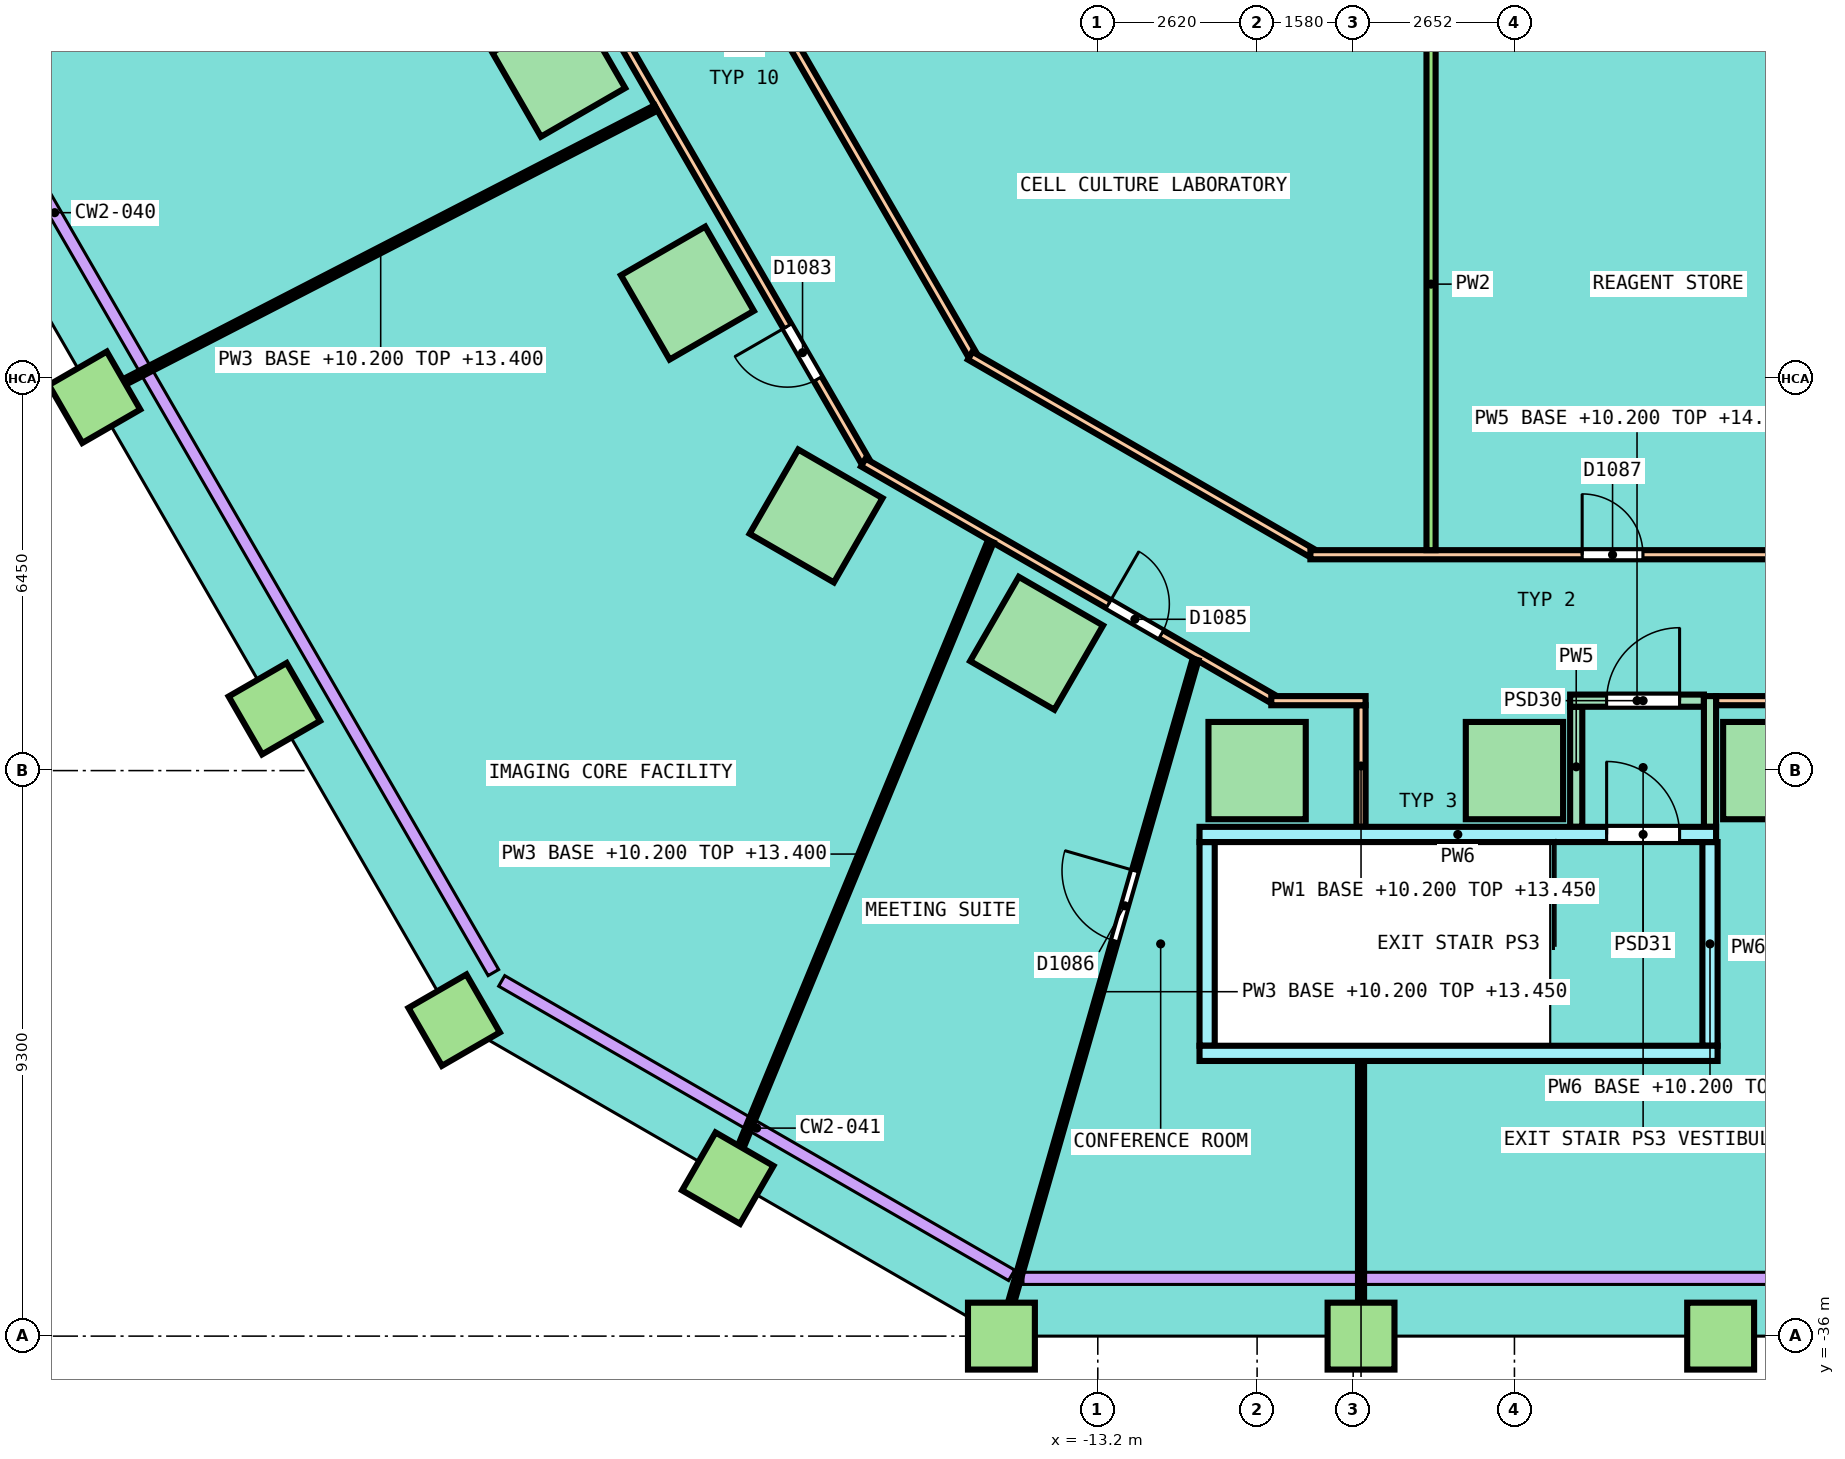
"""IFC4 building model, lengths in metres.
Left out: names, types, materials, properties, quantities, classifications, styles, units other than length and angle.
Written with IfcOpenShell. Run it as: python <this file> out.ifc"""

import sys

from ifc_helpers import new_model, si_unit, direction, frame, frame_2d, origin, origin_2d, place, context, subcontext, project, spatial, rectangle, extrude, element, fill, save


model = new_model("IFC4")
c1 = context("Model", 3, precision=1e-05, world=origin(), true_north=direction((0.0, 1.0)))
c2 = subcontext(c1, "Body", "Model", "MODEL_VIEW")
j1 = project(units=[si_unit("LENGTHUNIT", "METRE"), si_unit("PLANEANGLEUNIT", "RADIAN")], contexts=[c1])
p1 = place(None, origin())
s1 = spatial("IfcSite", under=j1, at=p1, CompositionType="ELEMENT")
p2 = place(p1, origin())
s2 = spatial("IfcBuilding", under=s1, at=p2, CompositionType="ELEMENT")
p3 = place(p2, frame((0.0, 0.0, 10.2)))
s3 = spatial("IfcBuildingStorey", under=s2, at=p3, CompositionType="ELEMENT", Elevation=10.2)
for number, where, z_axis, x_axis in (
    (1, (-22.065, -15.183, 0.0), (0.0, 0.0, 1.0), (0.5, -0.866, 0.0)),
    (2, (-19.949, -18.847, 0.0), (0.0, 0.0, 1.0), (0.5, -0.866, 0.0)),
    (3, (-17.833, -22.512, 0.0), (0.0, 0.0, 1.0), (0.866, -0.5, 0.0)),
    (4, (-14.206, -24.606, 0.0), (0.0, 0.0, 1.0), (0.866, -0.5, 0.0)),
    (5, (-10.58, -26.7, 0.0), (0.0, 0.0, 1.0), (1.0, 0.0, 0.0)),
    (6, (-6.348, -26.7, 0.0), (0.0, 0.0, 1.0), (1.0, 0.0, 0.0)),
    (7, (-2.116, -26.7, 0.0), (0.0, 0.0, 1.0), (1.0, 0.0, 0.0)),
):
    element("IfcColumn", number, at=place(p3, frame(where, z_axis=z_axis, x_axis=x_axis)), inside=s3, PredefinedType="COLUMN", context=c2, shape_type="SweptSolid", body=[
        extrude(rectangle(XDim=1.6, YDim=1.6, at=origin_2d()), origin(), (0.0, 0.0, 1.0), 4.05),
    ])
for number, where, z_axis, x_axis in (
    (8, (-29.698, -20.561, 0.0), (0.0, 0.0, 1.0), (0.5, -0.866, 0.0)),
    (9, (-26.741, -25.682, 0.0), (0.0, 0.0, 1.0), (0.5, -0.866, 0.0)),
    (10, (-23.785, -30.804, 0.0), (0.0, 0.0, 1.0), (0.5, -0.866, 0.0)),
    (11, (-19.285, -33.402, 0.0), (0.0, 0.0, 1.0), (0.866, -0.5, 0.0)),
    (12, (-14.785, -36.0, 0.0), (0.0, 0.0, 1.0), (1.0, 0.0, 0.0)),
    (13, (-8.871, -36.0, 0.0), (0.0, 0.0, 1.0), (1.0, 0.0, 0.0)),
    (14, (-2.957, -36.0, 0.0), (0.0, 0.0, 1.0), (1.0, 0.0, 0.0)),
):
    element("IfcColumn", number, at=place(p3, frame(where, z_axis=z_axis, x_axis=x_axis)), inside=s3, PredefinedType="COLUMN", context=c2, shape_type="SweptSolid", body=[
        extrude(rectangle(XDim=1.1, YDim=1.1, at=origin_2d()), origin(), (0.0, 0.0, 1.0), 4.05),
    ])
p4 = place(p3, frame((-8.871, -27.625, 0.0), z_axis=(0.0, 0.0, 1.0), x_axis=(0.0, 1.0, 0.0)))
e15 = element("IfcWall", 15, at=p4, inside=s3, PredefinedType="PARTITIONING", context=c2, shape_type="SweptSolid", body=[
    extrude(rectangle(XDim=2.0, YDim=0.15, at=frame_2d((1.0, 0.0))), origin(), (0.0, 0.0, 1.0), 3.25),
])
p5 = place(p3, frame((-22.753, -6.89, 0.0), z_axis=(0.0, 0.0, 1.0), x_axis=(0.499997859304, -0.866026639712, 0.0)))
e16 = element("IfcWall", 16, at=p5, inside=s3, PredefinedType="PARTITIONING", context=c2, shape_type="SweptSolid", body=[
    extrude(rectangle(XDim=14.963, YDim=0.15, at=frame_2d((7.482, 0.0))), origin(), (0.0, 0.0, 1.0), 3.05),
])
p6 = place(p5, frame((7.098, 0.0, 0.0)))
e17 = element("IfcOpeningElement", 17, at=p6, cuts=e16, PredefinedType="OPENING", context=c2, shape_type="SweptSolid", body=[
    extrude(rectangle(XDim=1.2, YDim=2.1, at=frame_2d((0.6, 1.05))), frame((0.0, 0.085, 0.0), z_axis=(0.0, -1.0, 0.0), x_axis=(1.0, 0.0, 0.0)), (0.0, 0.0, 1.0), 0.17),
])
p7 = place(p3, frame((-27.3, -3.814, 0.0), z_axis=(0.0, 0.0, 1.0), x_axis=(0.499997805905, -0.866026670542, 0.0)))
e18 = element("IfcWall", 18, at=p7, inside=s3, PredefinedType="PARTITIONING", context=c2, shape_type="SweptSolid", body=[
    extrude(rectangle(XDim=20.543, YDim=0.15, at=frame_2d((10.272, 0.0))), origin(), (0.0, 0.0, 1.0), 3.05),
])
p8 = place(p7, frame((4.954, 0.0, 0.0)))
e19 = element("IfcOpeningElement", 19, at=p8, cuts=e18, PredefinedType="OPENING", context=c2, shape_type="SweptSolid", body=[
    extrude(rectangle(XDim=1.2, YDim=2.1, at=frame_2d((0.6, 1.05))), frame((0.0, 0.085, 0.0), z_axis=(0.0, -1.0, 0.0), x_axis=(1.0, 0.0, 0.0)), (0.0, 0.0, 1.0), 0.17),
])
p9 = place(p7, frame((17.99, 0.0, 0.0)))
e20 = element("IfcOpeningElement", 20, at=p9, cuts=e18, PredefinedType="OPENING", context=c2, shape_type="SweptSolid", body=[
    extrude(rectangle(XDim=1.0, YDim=2.1, at=frame_2d((0.5, 1.05))), frame((0.0, 0.085, 0.0), z_axis=(0.0, -1.0, 0.0), x_axis=(1.0, 0.0, 0.0)), (0.0, 0.0, 1.0), 0.17),
])
p10 = place(p3, frame((-17.056, -21.633, 0.0), z_axis=(0.0, 0.0, 1.0), x_axis=(0.866023143435, -0.50000391502, 0.0)))
e21 = element("IfcWall", 21, at=p10, inside=s3, PredefinedType="PARTITIONING", context=c2, shape_type="SweptSolid", body=[
    extrude(rectangle(XDim=7.759, YDim=0.15, at=frame_2d((3.879, 0.0))), origin(), (0.0, 0.0, 1.0), 3.05),
])
p11 = place(p10, frame((4.657, 0.0, 0.0)))
e22 = element("IfcOpeningElement", 22, at=p11, cuts=e21, PredefinedType="OPENING", context=c2, shape_type="SweptSolid", body=[
    extrude(rectangle(XDim=1.0, YDim=2.1, at=frame_2d((0.5, 1.05))), frame((0.0, 0.085, 0.0), z_axis=(0.0, -1.0, 0.0), x_axis=(1.0, 0.0, 0.0)), (0.0, 0.0, 1.0), 0.17),
])
p12 = place(p3, frame((-15.299, -19.876, 0.0), z_axis=(0.0, 0.0, 1.0), x_axis=(0.866024786089, -0.500001069878, 0.0)))
e23 = element("IfcWall", 23, at=p12, inside=s3, PredefinedType="PARTITIONING", context=c2, shape_type="SweptSolid", body=[
    extrude(rectangle(XDim=6.473, YDim=0.15, at=frame_2d((3.236, 0.0))), origin(), (0.0, 0.0, 1.0), 3.05),
])
p13 = place(p3, frame((-9.704, -23.15, 0.0), z_axis=(0.0, 0.0, 1.0), x_axis=(1.0, 0.0, 0.0)))
e24 = element("IfcWall", 24, at=p13, inside=s3, PredefinedType="PARTITIONING", context=c2, shape_type="SweptSolid", body=[
    extrude(rectangle(XDim=16.429, YDim=0.15, at=frame_2d((8.214, 0.0))), origin(), (0.0, 0.0, 1.0), 3.05),
])
p14 = place(p13, frame((4.469, 0.0, 0.0)))
e25 = element("IfcOpeningElement", 25, at=p14, cuts=e24, PredefinedType="OPENING", context=c2, shape_type="SweptSolid", body=[
    extrude(rectangle(XDim=1.0, YDim=2.1, at=frame_2d((0.5, 1.05))), frame((0.0, 0.085, 0.0), z_axis=(0.0, -1.0, 0.0), x_axis=(1.0, 0.0, 0.0)), (0.0, 0.0, 1.0), 0.17),
])
p15 = place(p3, frame((-10.347, -25.55, 0.0), z_axis=(0.0, 0.0, 1.0), x_axis=(1.0, 0.0, 0.0)))
e26 = element("IfcWall", 26, at=p15, inside=s3, PredefinedType="PARTITIONING", context=c2, shape_type="SweptSolid", body=[
    extrude(rectangle(XDim=1.551, YDim=0.15, at=frame_2d((0.775, 0.0))), origin(), (0.0, 0.0, 1.0), 3.05),
])
p16 = place(p3, frame((-3.032, -25.55, 0.0), z_axis=(0.0, 0.0, 1.0), x_axis=(1.0, 0.0, 0.0)))
e27 = element("IfcWall", 27, at=p16, inside=s3, PredefinedType="PARTITIONING", context=c2, shape_type="SweptSolid", body=[
    extrude(rectangle(XDim=6.064, YDim=0.15, at=frame_2d((3.032, 0.0))), origin(), (0.0, 0.0, 1.0), 3.05),
])
p17 = place(p16, frame((2.432, 0.0, 0.0)))
e28 = element("IfcOpeningElement", 28, at=p17, cuts=e27, PredefinedType="OPENING", context=c2, shape_type="SweptSolid", body=[
    extrude(rectangle(XDim=1.2, YDim=2.1, at=frame_2d((0.6, 1.05))), frame((0.0, 0.085, 0.0), z_axis=(0.0, -1.0, 0.0), x_axis=(1.0, 0.0, 0.0)), (0.0, 0.0, 1.0), 0.17),
])
p18 = place(p3, frame((-5.332, -27.625, 0.0), z_axis=(0.0, 0.0, 1.0), x_axis=(0.0, 1.0, 0.0)))
e29 = element("IfcWall", 29, at=p18, inside=s3, PredefinedType="PARTITIONING", context=c2, shape_type="SweptSolid", body=[
    extrude(rectangle(XDim=1.975, YDim=0.2, at=frame_2d((0.988, 0.0))), origin(), (0.0, 0.0, 1.0), 3.25),
])
p19 = place(p3, frame((-5.432, -25.55, 0.0), z_axis=(0.0, 0.0, 1.0), x_axis=(1.0, 0.0, 0.0)))
e30 = element("IfcWall", 30, at=p19, inside=s3, PredefinedType="PARTITIONING", context=c2, shape_type="SweptSolid", body=[
    extrude(rectangle(XDim=2.2, YDim=0.2, at=frame_2d((1.1, 0.0))), origin(), (0.0, 0.0, 1.0), 4.05),
])
p20 = place(p19, frame((1.8, 0.0, 0.0), z_axis=(0.0, 0.0, 1.0), x_axis=(-1.0, 0.0, 0.0)))
e31 = element("IfcOpeningElement", 31, at=p20, cuts=e30, PredefinedType="OPENING", context=c2, shape_type="SweptSolid", body=[
    extrude(rectangle(XDim=1.2, YDim=2.1, at=frame_2d((0.6, 1.05))), frame((0.0, 0.11, 0.0), z_axis=(0.0, -1.0, 0.0), x_axis=(1.0, 0.0, 0.0)), (0.0, 0.0, 1.0), 0.22),
])
p21 = place(p3, frame((-3.132, -27.625, 0.0), z_axis=(0.0, 0.0, 1.0), x_axis=(0.0, 1.0, 0.0)))
e32 = element("IfcWall", 32, at=p21, inside=s3, PredefinedType="PARTITIONING", context=c2, shape_type="SweptSolid", body=[
    extrude(rectangle(XDim=2.15, YDim=0.2, at=frame_2d((1.075, 0.0))), origin(), (0.0, 0.0, 1.0), 3.25),
])
p22 = place(p3, frame((-7.719, -23.075, 0.0), z_axis=(0.0, 0.0, 1.0), x_axis=(0.0, 1.0, 0.0)))
e33 = element("IfcWall", 33, at=p22, inside=s3, PredefinedType="PARTITIONING", context=c2, shape_type="SweptSolid", body=[
    extrude(rectangle(XDim=8.75, YDim=0.15, at=frame_2d((4.375, 0.0))), origin(), (0.0, 0.0, 1.0), 3.05),
])
p23 = place(p3, frame((-8.871, -35.8, 0.0), z_axis=(0.0, 0.0, 1.0), x_axis=(0.0, 1.0, 0.0)))
e34 = element("IfcWall", 34, at=p23, inside=s3, PredefinedType="PARTITIONING", context=c2, shape_type="SweptSolid", body=[
    extrude(rectangle(XDim=4.325, YDim=0.1, at=frame_2d((2.163, 0.0))), origin(), (0.0, 0.0, 1.0), 4.0),
])
p24 = place(p3, frame((-29.521, -20.469, 0.0), z_axis=(0.0, 0.0, 1.0), x_axis=(0.888930498325, 0.458042104122, 0.0)))
e35 = element("IfcWall", 35, at=p24, inside=s3, PredefinedType="PARTITIONING", context=c2, shape_type="SweptSolid", body=[
    extrude(rectangle(XDim=10.187, YDim=0.1, at=frame_2d((5.093, 0.0))), origin(), (0.0, 0.0, 1.0), 3.2),
])
p25 = place(p3, frame((-19.208, -33.216, 0.0), z_axis=(0.0, 0.0, 1.0), x_axis=(0.38176137663, 0.924260921663, 0.0)))
e36 = element("IfcWall", 36, at=p25, inside=s3, PredefinedType="PARTITIONING", context=c2, shape_type="SweptSolid", body=[
    extrude(rectangle(XDim=11.129, YDim=0.1, at=frame_2d((5.564, 0.0))), origin(), (0.0, 0.0, 1.0), 3.2),
])
p26 = place(p3, frame((-14.727, -35.8, 0.0), z_axis=(0.0, 0.0, 1.0), x_axis=(0.27581573325, 0.96121052912, 0.0)))
e37 = element("IfcWall", 37, at=p26, inside=s3, PredefinedType="PARTITIONING", context=c2, shape_type="SweptSolid", body=[
    extrude(rectangle(XDim=11.369, YDim=0.1, at=frame_2d((5.685, 0.0))), origin(), (0.0, 0.0, 1.0), 3.25),
])
p27 = place(p26, frame((6.553, 0.0, 0.0)))
e38 = element("IfcOpeningElement", 38, at=p27, cuts=e37, PredefinedType="OPENING", context=c2, shape_type="SweptSolid", body=[
    extrude(rectangle(XDim=1.2, YDim=2.1, at=frame_2d((0.6, 1.05))), frame((0.0, 0.06, 0.0), z_axis=(0.0, -1.0, 0.0), x_axis=(1.0, 0.0, 0.0)), (0.0, 0.0, 1.0), 0.12),
])
p28 = place(p3, frame((-11.402, -31.225, 0.0), z_axis=(0.0, 0.0, 1.0), x_axis=(0.0, 1.0, 0.0)))
e39 = element("IfcWall", 39, at=p28, inside=s3, PredefinedType="SOLIDWALL", context=c2, shape_type="SweptSolid", body=[
    extrude(rectangle(XDim=3.35, YDim=0.25, at=frame_2d((1.675, 0.0))), origin(), (0.0, 0.0, 1.0), 3.2),
])
p29 = place(p3, frame((-3.132, -31.225, 0.0), z_axis=(0.0, 0.0, 1.0), x_axis=(0.0, 1.0, 0.0)))
e40 = element("IfcWall", 40, at=p29, inside=s3, PredefinedType="SOLIDWALL", context=c2, shape_type="SweptSolid", body=[
    extrude(rectangle(XDim=3.35, YDim=0.25, at=frame_2d((1.675, 0.0))), origin(), (0.0, 0.0, 1.0), 4.0),
])
p30 = place(p3, frame((-11.527, -27.75, 0.0), z_axis=(0.0, 0.0, 1.0), x_axis=(1.0, 0.0, 0.0)))
e41 = element("IfcWall", 41, at=p30, inside=s3, PredefinedType="SOLIDWALL", context=c2, shape_type="SweptSolid", body=[
    extrude(rectangle(XDim=8.495, YDim=0.25, at=frame_2d((4.248, 0.0))), origin(), (0.0, 0.0, 1.0), 3.2),
])
p31 = place(p30, frame((7.895, 0.0, 0.0), z_axis=(0.0, 0.0, 1.0), x_axis=(-1.0, 0.0, 0.0)))
e42 = element("IfcOpeningElement", 42, at=p31, cuts=e41, PredefinedType="OPENING", context=c2, shape_type="SweptSolid", body=[
    extrude(rectangle(XDim=1.2, YDim=2.1, at=frame_2d((0.6, 1.05))), frame((0.0, 0.135, 0.0), z_axis=(0.0, -1.0, 0.0), x_axis=(1.0, 0.0, 0.0)), (0.0, 0.0, 1.0), 0.27),
])
p32 = place(p3, frame((-11.527, -31.35, 0.0), z_axis=(0.0, 0.0, 1.0), x_axis=(1.0, 0.0, 0.0)))
e43 = element("IfcWall", 43, at=p32, inside=s3, PredefinedType="SOLIDWALL", context=c2, shape_type="SweptSolid", body=[
    extrude(rectangle(XDim=8.52, YDim=0.25, at=frame_2d((4.26, 0.0))), origin(), (0.0, 0.0, 1.0), 3.2),
])
p33 = place(p3, frame((-24.277, -29.951, 0.0), z_axis=(0.0, 0.0, 1.0), x_axis=(-0.866031096941, -0.499990139034, 0.0)))
e44 = element("IfcWall", 44, at=p33, inside=s3, PredefinedType="SOLIDWALL", context=c2, shape_type="SweptSolid", body=[
    extrude(rectangle(XDim=3.0, YDim=0.4, at=frame_2d((1.5, 0.0))), origin(), (0.0, 0.0, 1.0), 4.2),
])
for number, where, z_axis, x_axis in (
    (45, (-31.15, -18.446, 0.0), (0.0, 0.0, 1.0), (0.5, -0.866, 0.0)),
    (46, (-33.402, -19.746, 0.0), (0.0, 0.0, 1.0), (0.5, -0.866, 0.0)),
):
    element("IfcWall", number, at=place(p3, frame(where, z_axis=z_axis, x_axis=x_axis)), inside=s3, PredefinedType="SOLIDWALL", context=c2, shape_type="SweptSolid", body=[
        extrude(rectangle(XDim=13.2, YDim=0.4, at=frame_2d((6.6, 0.0))), origin(), (0.0, 0.0, 1.0), 4.2),
    ])
p34 = place(p3, frame((-30.252, -33.401, 0.0), z_axis=(0.0, 0.0, 1.0), x_axis=(-0.866022959057, -0.500004234368, 0.0)))
e47 = element("IfcWall", 47, at=p34, inside=s3, PredefinedType="SOLIDWALL", context=c2, shape_type="SweptSolid", body=[
    extrude(rectangle(XDim=2.5, YDim=0.4, at=frame_2d((1.25, 0.0))), origin(), (0.0, 0.0, 1.0), 2.0),
])
p35 = place(p3, frame((-37.126, -21.896, 0.0), z_axis=(0.0, 0.0, 1.0), x_axis=(0.500010103361, -0.866019570528, 0.0)))
e48 = element("IfcWall", 48, at=p35, inside=s3, PredefinedType="SOLIDWALL", context=c2, shape_type="SweptSolid", body=[
    extrude(rectangle(XDim=13.2, YDim=0.4, at=frame_2d((6.6, 0.0))), origin(), (0.0, 0.0, 1.0), 2.0),
])
p36 = place(p3, frame((-24.077, -30.298, 0.0), z_axis=(0.0, 0.0, 1.0), x_axis=(-0.866031096941, -0.499990139034, 0.0)))
e49 = element("IfcWall", 49, at=p36, inside=s3, PredefinedType="SOLIDWALL", context=c2, shape_type="SweptSolid", body=[
    extrude(rectangle(XDim=3.0, YDim=0.4, at=frame_2d((1.5, 0.0))), origin(), (0.0, 0.0, 1.0), 4.4),
])
p37 = place(p3, frame((-26.675, -31.798, 0.0), z_axis=(0.0, 0.0, 1.0), x_axis=(-0.866000020948, -0.500043961785, 0.0)))
e50 = element("IfcWall", 50, at=p37, inside=s3, PredefinedType="SOLIDWALL", context=c2, shape_type="SweptSolid", body=[
    extrude(rectangle(XDim=1.95, YDim=0.4, at=frame_2d((0.975, 0.0))), origin(), (0.0, 0.0, 1.0), 4.4),
])
p38 = place(p3, frame((-28.364, -32.773, 0.0), z_axis=(0.0, 0.0, 1.0), x_axis=(-0.866054235095, -0.49995005938, 0.0)))
e51 = element("IfcWall", 51, at=p38, inside=s3, PredefinedType="SOLIDWALL", context=c2, shape_type="SweptSolid", body=[
    extrude(rectangle(XDim=1.95, YDim=0.4, at=frame_2d((0.975, 0.0))), origin(), (0.0, 0.0, 1.0), 3.379),
])
p39 = place(p3, frame((-30.052, -33.748, 0.0), z_axis=(0.0, 0.0, 1.0), x_axis=(-0.866022959057, -0.500004234368, 0.0)))
e52 = element("IfcWall", 52, at=p39, inside=s3, PredefinedType="SOLIDWALL", context=c2, shape_type="SweptSolid", body=[
    extrude(rectangle(XDim=2.5, YDim=0.4, at=frame_2d((1.25, 0.0))), origin(), (0.0, 0.0, 1.0), 2.2),
])
p40 = place(p9, origin())
e53 = element("IfcDoor", 53, at=p40, inside=s3, OperationType="SINGLE_SWING_RIGHT", PredefinedType="DOOR", context=c2, shape_type="SweptSolid", body=[
    extrude(rectangle(XDim=1.0, YDim=2.1, at=frame_2d((0.5, 1.05))), frame((0.0, 0.025, 0.0), z_axis=(0.0, -1.0, 0.0), x_axis=(1.0, 0.0, 0.0)), (0.0, 0.0, 1.0), 0.05),
])
fill(e20, e53)
p41 = place(p11, origin())
e54 = element("IfcDoor", 54, at=p41, inside=s3, OperationType="SINGLE_SWING_RIGHT", PredefinedType="DOOR", context=c2, shape_type="SweptSolid", body=[
    extrude(rectangle(XDim=1.0, YDim=2.1, at=frame_2d((0.5, 1.05))), frame((0.0, 0.025, 0.0), z_axis=(0.0, -1.0, 0.0), x_axis=(1.0, 0.0, 0.0)), (0.0, 0.0, 1.0), 0.05),
])
fill(e22, e54)
p42 = place(p27, origin())
e55 = element("IfcDoor", 55, at=p42, inside=s3, OperationType="DOUBLE_DOOR_SINGLE_SWING", PredefinedType="DOOR", context=c2, shape_type="SweptSolid", body=[
    extrude(rectangle(XDim=1.2, YDim=2.1, at=frame_2d((0.6, 1.05))), frame((0.0, 0.025, 0.0), z_axis=(0.0, -1.0, 0.0), x_axis=(1.0, 0.0, 0.0)), (0.0, 0.0, 1.0), 0.05),
])
fill(e38, e55)
p43 = place(p14, origin())
e56 = element("IfcDoor", 56, at=p43, inside=s3, OperationType="SINGLE_SWING_RIGHT", PredefinedType="DOOR", context=c2, shape_type="SweptSolid", body=[
    extrude(rectangle(XDim=1.0, YDim=2.1, at=frame_2d((0.5, 1.05))), frame((0.0, 0.025, 0.0), z_axis=(0.0, -1.0, 0.0), x_axis=(1.0, 0.0, 0.0)), (0.0, 0.0, 1.0), 0.05),
])
fill(e25, e56)
p44 = place(p20, origin())
e57 = element("IfcDoor", 57, at=p44, inside=s3, OperationType="SINGLE_SWING_LEFT", PredefinedType="DOOR", context=c2, shape_type="SweptSolid", body=[
    extrude(rectangle(XDim=1.2, YDim=2.1, at=frame_2d((0.6, 1.05))), frame((0.0, 0.025, 0.0), z_axis=(0.0, -1.0, 0.0), x_axis=(1.0, 0.0, 0.0)), (0.0, 0.0, 1.0), 0.05),
])
fill(e31, e57)
p45 = place(p31, origin())
e58 = element("IfcDoor", 58, at=p45, inside=s3, OperationType="SINGLE_SWING_RIGHT", PredefinedType="DOOR", context=c2, shape_type="SweptSolid", body=[
    extrude(rectangle(XDim=1.2, YDim=2.1, at=frame_2d((0.6, 1.05))), frame((0.0, 0.025, 0.0), z_axis=(0.0, -1.0, 0.0), x_axis=(1.0, 0.0, 0.0)), (0.0, 0.0, 1.0), 0.05),
])
fill(e42, e58)
save(model, sys.argv[1])
